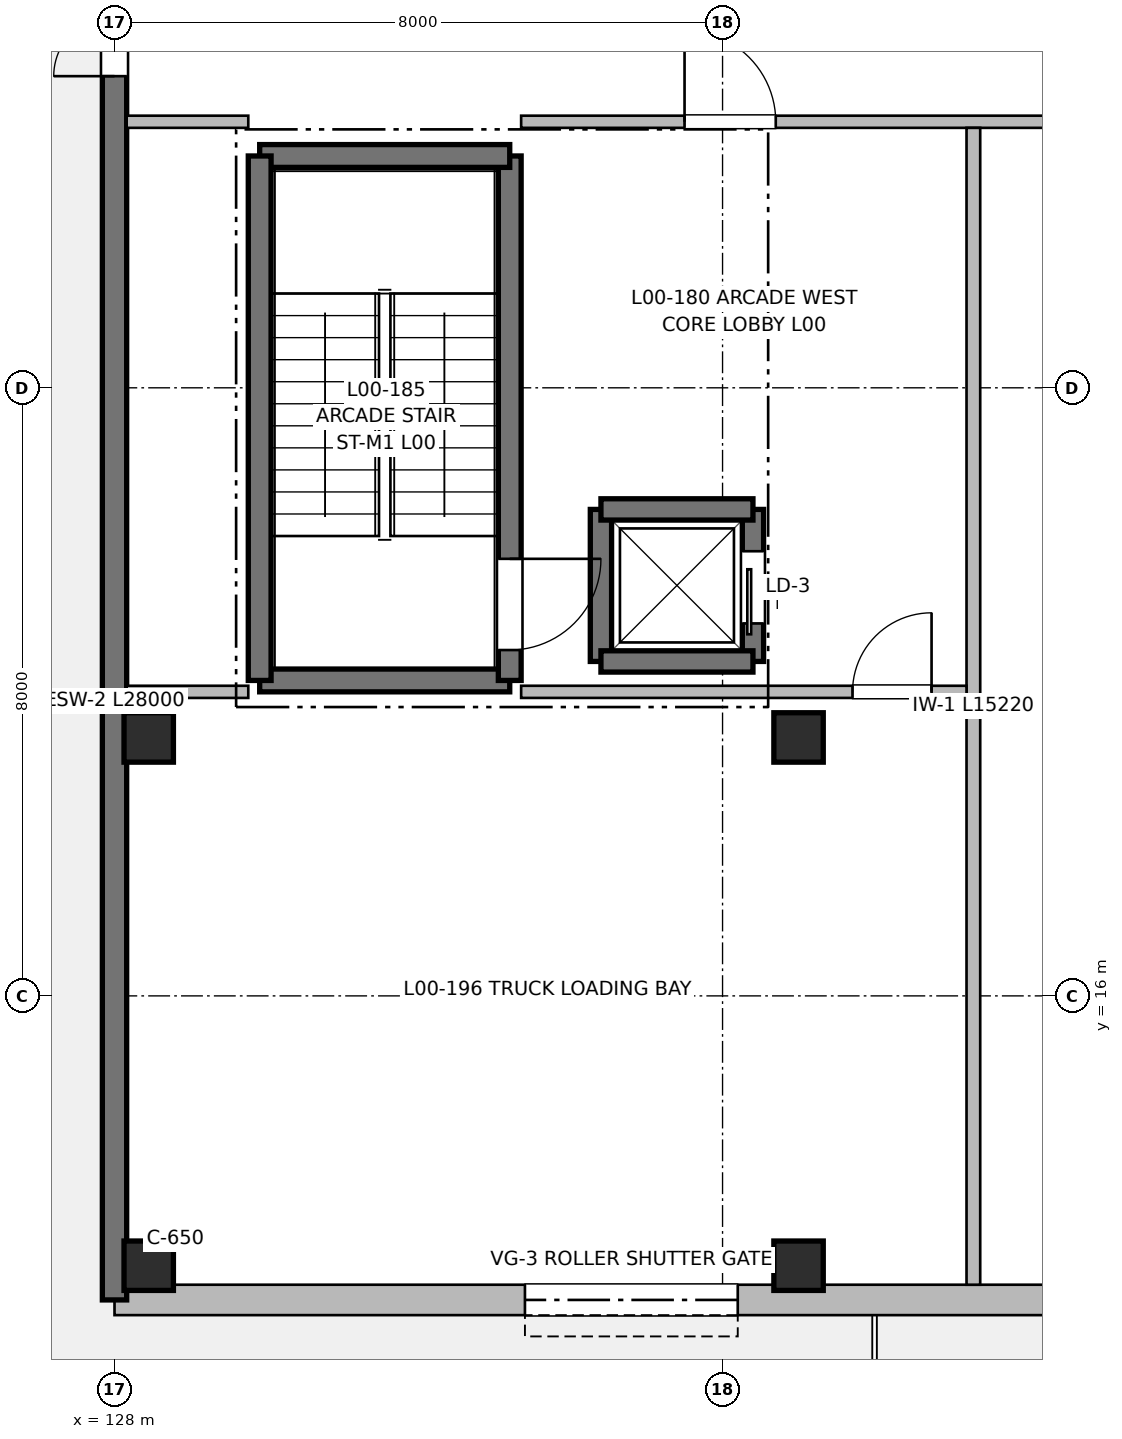
"""IFC4 building model, lengths in metres.
Left out: names, types, materials, properties, quantities, classifications, styles, units other than length and angle.
Written with IfcOpenShell. Run it as: python <this file> out.ifc"""

import sys

from ifc_helpers import new_model, si_unit, direction, frame, frame_2d, origin, origin_2d, place, context, subcontext, project, spatial, rectangle, extrude, element, fill, save


model = new_model("IFC4")
c1 = context("Model", 3, precision=1e-05, world=origin(), true_north=direction((0.0, 1.0)))
c2 = subcontext(c1, "Body", "Model", "MODEL_VIEW")
j1 = project(units=[si_unit("LENGTHUNIT", "METRE"), si_unit("PLANEANGLEUNIT", "RADIAN")], contexts=[c1])
p1 = place(None, origin())
s1 = spatial("IfcSite", under=j1, at=p1, CompositionType="ELEMENT")
p2 = place(p1, origin())
s2 = spatial("IfcBuilding", under=s1, at=p2, CompositionType="ELEMENT")
p3 = place(p2, origin())
s3 = spatial("IfcBuildingStorey", under=s2, at=p3, CompositionType="ELEMENT", Elevation=0.0)
for number, where, z_axis, x_axis in (
    (1, (128.45, 12.45, 0.0), (0.0, 0.0, 1.0), (1.0, 0.0, 0.0)),
    (2, (128.45, 19.4, 0.0), (0.0, 0.0, 1.0), (1.0, 0.0, 0.0)),
    (3, (137.0, 12.45, 0.0), (0.0, 0.0, 1.0), (1.0, 0.0, 0.0)),
    (4, (137.0, 19.4, 0.0), (0.0, 0.0, 1.0), (1.0, 0.0, 0.0)),
):
    element("IfcColumn", number, at=place(p3, frame(where, z_axis=z_axis, x_axis=x_axis)), inside=s3, PredefinedType="COLUMN", context=c2, shape_type="SweptSolid", body=[
        extrude(rectangle(XDim=0.65, YDim=0.65, at=origin_2d()), origin(), (0.0, 0.0, 1.0), 4.16),
    ])
p4 = place(p3, frame((176.0, 12.0, 0.0), z_axis=(0.0, 0.0, 1.0), x_axis=(-1.0, 0.0, 0.0)))
e5 = element("IfcWall", 5, at=p4, inside=s3, PredefinedType="SOLIDWALL", context=c2, shape_type="SweptSolid", body=[
    extrude(rectangle(XDim=48.0, YDim=0.4, at=frame_2d((24.0, 0.0))), origin(), (0.0, 0.0, 1.0), 3.9),
])
p5 = place(p4, frame((3.5, 0.0, 0.0)))
e6 = element("IfcOpeningElement", 6, at=p5, cuts=e5, PredefinedType="OPENING", context=c2, shape_type="SweptSolid", body=[
    extrude(rectangle(XDim=3.6, YDim=2.8, at=frame_2d((1.8, 1.4))), frame((0.0, 0.21, 0.0), z_axis=(0.0, -1.0, 0.0), x_axis=(1.0, 0.0, 0.0)), (0.0, 0.0, 1.0), 0.42),
])
p6 = place(p4, frame((18.85, 0.0, 0.0)))
e7 = element("IfcOpeningElement", 7, at=p6, cuts=e5, PredefinedType="OPENING", context=c2, shape_type="SweptSolid", body=[
    extrude(rectangle(XDim=3.6, YDim=2.8, at=frame_2d((1.8, 1.4))), frame((0.0, 0.21, 0.0), z_axis=(0.0, -1.0, 0.0), x_axis=(1.0, 0.0, 0.0)), (0.0, 0.0, 1.0), 0.42),
])
p7 = place(p4, frame((30.45, 0.0, 0.0)))
e8 = element("IfcOpeningElement", 8, at=p7, cuts=e5, PredefinedType="OPENING", context=c2, shape_type="SweptSolid", body=[
    extrude(rectangle(XDim=2.8, YDim=2.5, at=frame_2d((1.4, 1.25))), frame((0.0, 0.21, 0.0), z_axis=(0.0, -1.0, 0.0), x_axis=(1.0, 0.0, 0.0)), (0.0, 0.0, 1.0), 0.42),
])
p8 = place(p4, frame((39.8, 0.0, 0.0)))
e9 = element("IfcOpeningElement", 9, at=p8, cuts=e5, PredefinedType="OPENING", context=c2, shape_type="SweptSolid", body=[
    extrude(rectangle(XDim=2.8, YDim=2.5, at=frame_2d((1.4, 1.25))), frame((0.0, 0.21, 0.0), z_axis=(0.0, -1.0, 0.0), x_axis=(1.0, 0.0, 0.0)), (0.0, 0.0, 1.0), 0.42),
])
p9 = place(p3, frame((128.0, 12.0, 0.0), z_axis=(0.0, 0.0, 1.0), x_axis=(0.0, 1.0, 0.0)))
e10 = element("IfcWall", 10, at=p9, inside=s3, PredefinedType="SHEAR", context=c2, shape_type="SweptSolid", body=[
    extrude(rectangle(XDim=28.0, YDim=0.32, at=frame_2d((14.0, 0.0))), origin(), (0.0, 0.0, 1.0), 3.9),
])
p10 = place(p9, frame((16.1, 0.0, 0.0)))
e11 = element("IfcOpeningElement", 11, at=p10, cuts=e10, PredefinedType="OPENING", context=c2, shape_type="SweptSolid", body=[
    extrude(rectangle(XDim=1.6, YDim=2.35, at=frame_2d((0.8, 1.175))), frame((0.0, 0.17, 0.0), z_axis=(0.0, -1.0, 0.0), x_axis=(1.0, 0.0, 0.0)), (0.0, 0.0, 1.0), 0.34),
])
p11 = place(p3, frame((136.4, 20.4, 0.0), z_axis=(0.0, 0.0, 1.0), x_axis=(0.0, 1.0, 0.0)))
e12 = element("IfcWall", 12, at=p11, inside=s3, PredefinedType="SHEAR", context=c2, shape_type="SweptSolid", body=[
    extrude(rectangle(XDim=2.0, YDim=0.28, at=frame_2d((1.0, 0.0))), origin(), (0.0, 0.0, 1.0), 3.9),
])
p12 = place(p11, frame((0.5, 0.0, 0.0)))
e13 = element("IfcOpeningElement", 13, at=p12, cuts=e12, PredefinedType="OPENING", context=c2, shape_type="SweptSolid", body=[
    extrude(rectangle(XDim=0.95, YDim=2.15, at=frame_2d((0.475, 1.075))), frame((0.0, 0.15, 0.0), z_axis=(0.0, -1.0, 0.0), x_axis=(1.0, 0.0, 0.0)), (0.0, 0.0, 1.0), 0.3),
])
for number, where, z_axis, x_axis in (
    (14, (134.4, 20.4, 0.0), (0.0, 0.0, 1.0), (0.0, 1.0, 0.0)),
    (15, (134.4, 20.4, 0.0), (0.0, 0.0, 1.0), (1.0, 0.0, 0.0)),
    (16, (134.4, 22.4, 0.0), (0.0, 0.0, 1.0), (1.0, 0.0, 0.0)),
):
    element("IfcWall", number, at=place(p3, frame(where, z_axis=z_axis, x_axis=x_axis)), inside=s3, PredefinedType="SHEAR", context=c2, shape_type="SweptSolid", body=[
        extrude(rectangle(XDim=2.0, YDim=0.28, at=frame_2d((1.0, 0.0))), origin(), (0.0, 0.0, 1.0), 3.9),
    ])
p13 = place(p3, frame((133.2, 20.15, 0.0), z_axis=(0.0, 0.0, 1.0), x_axis=(-1.0, 0.0, 0.0)))
e17 = element("IfcWall", 17, at=p13, inside=s3, PredefinedType="SHEAR", context=c2, shape_type="SweptSolid", body=[
    extrude(rectangle(XDim=3.29, YDim=0.3, at=frame_2d((1.645, 0.0))), origin(), (0.0, 0.0, 1.0), 4.16),
])
p14 = place(p3, frame((133.2, 27.05, 0.0), z_axis=(0.0, 0.0, 1.0), x_axis=(0.0, -1.0, 0.0)))
e18 = element("IfcWall", 18, at=p14, inside=s3, PredefinedType="SHEAR", context=c2, shape_type="SweptSolid", body=[
    extrude(rectangle(XDim=6.9, YDim=0.3, at=frame_2d((3.45, 0.0))), origin(), (0.0, 0.0, 1.0), 4.16),
])
p15 = place(p14, frame((5.3, 0.0, 0.0)))
e19 = element("IfcOpeningElement", 19, at=p15, cuts=e18, PredefinedType="OPENING", context=c2, shape_type="SweptSolid", body=[
    extrude(rectangle(XDim=1.2, YDim=2.2, at=frame_2d((0.6, 1.1))), frame((0.0, 0.16, 0.0), z_axis=(0.0, -1.0, 0.0), x_axis=(1.0, 0.0, 0.0)), (0.0, 0.0, 1.0), 0.32),
])
p16 = place(p3, frame((129.91, 27.05, 0.0), z_axis=(0.0, 0.0, 1.0), x_axis=(1.0, 0.0, 0.0)))
e20 = element("IfcWall", 20, at=p16, inside=s3, PredefinedType="SHEAR", context=c2, shape_type="SweptSolid", body=[
    extrude(rectangle(XDim=3.29, YDim=0.3, at=frame_2d((1.645, 0.0))), origin(), (0.0, 0.0, 1.0), 4.16),
])
p17 = place(p3, frame((129.91, 20.15, 0.0), z_axis=(0.0, 0.0, 1.0), x_axis=(0.0, 1.0, 0.0)))
e21 = element("IfcWall", 21, at=p17, inside=s3, PredefinedType="SHEAR", context=c2, shape_type="SweptSolid", body=[
    extrude(rectangle(XDim=6.9, YDim=0.3, at=frame_2d((3.45, 0.0))), origin(), (0.0, 0.0, 1.0), 4.16),
])
p18 = place(p3, frame((128.16, 27.5, 0.0), z_axis=(0.0, 0.0, 1.0), x_axis=(1.0, 0.0, 0.0)))
e22 = element("IfcWall", 22, at=p18, inside=s3, PredefinedType="PARTITIONING", context=c2, shape_type="SweptSolid", body=[
    extrude(rectangle(XDim=1.6, YDim=0.16, at=frame_2d((0.8, 0.0))), origin(), (0.0, 0.0, 1.0), 3.89),
])
p19 = place(p3, frame((133.35, 27.5, 0.0), z_axis=(0.0, 0.0, 1.0), x_axis=(1.0, 0.0, 0.0)))
e23 = element("IfcWall", 23, at=p19, inside=s3, PredefinedType="PARTITIONING", context=c2, shape_type="SweptSolid", body=[
    extrude(rectangle(XDim=36.01, YDim=0.16, at=frame_2d((18.005, 0.0))), origin(), (0.0, 0.0, 1.0), 3.89),
])
p20 = place(p19, frame((2.15, 0.0, 0.0)))
e24 = element("IfcOpeningElement", 24, at=p20, cuts=e23, PredefinedType="OPENING", context=c2, shape_type="SweptSolid", body=[
    extrude(rectangle(XDim=1.2, YDim=2.2, at=frame_2d((0.6, 1.1))), frame((0.0, 0.09, 0.0), z_axis=(0.0, -1.0, 0.0), x_axis=(1.0, 0.0, 0.0)), (0.0, 0.0, 1.0), 0.18),
])
p21 = place(p19, frame((33.45, 0.0, 0.0)))
e25 = element("IfcOpeningElement", 25, at=p21, cuts=e23, PredefinedType="OPENING", context=c2, shape_type="SweptSolid", body=[
    extrude(rectangle(XDim=1.2, YDim=2.2, at=frame_2d((0.6, 1.1))), frame((0.0, 0.09, 0.0), z_axis=(0.0, -1.0, 0.0), x_axis=(1.0, 0.0, 0.0)), (0.0, 0.0, 1.0), 0.18),
])
p22 = place(p19, frame((8.93, 0.0, 0.0)))
e26 = element("IfcOpeningElement", 26, at=p22, cuts=e23, PredefinedType="OPENING", context=c2, shape_type="SweptSolid", body=[
    extrude(rectangle(XDim=1.12, YDim=2.2, at=frame_2d((0.56, 1.1))), frame((0.0, 0.09, 0.0), z_axis=(0.0, -1.0, 0.0), x_axis=(1.0, 0.0, 0.0)), (0.0, 0.0, 1.0), 0.18),
])
p23 = place(p19, frame((18.13, 0.0, 0.0)))
e27 = element("IfcOpeningElement", 27, at=p23, cuts=e23, PredefinedType="OPENING", context=c2, shape_type="SweptSolid", body=[
    extrude(rectangle(XDim=1.5, YDim=2.2, at=frame_2d((0.75, 1.1))), frame((0.0, 0.09, 0.0), z_axis=(0.0, -1.0, 0.0), x_axis=(1.0, 0.0, 0.0)), (0.0, 0.0, 1.0), 0.18),
])
p24 = place(p19, frame((25.53, 0.0, 0.0)))
e28 = element("IfcOpeningElement", 28, at=p24, cuts=e23, PredefinedType="OPENING", context=c2, shape_type="SweptSolid", body=[
    extrude(rectangle(XDim=0.86, YDim=2.1, at=frame_2d((0.43, 1.05))), frame((0.0, 0.09, 0.0), z_axis=(0.0, -1.0, 0.0), x_axis=(1.0, 0.0, 0.0)), (0.0, 0.0, 1.0), 0.18),
])
p25 = place(p19, frame((28.83, 0.0, 0.0)))
e29 = element("IfcOpeningElement", 29, at=p25, cuts=e23, PredefinedType="OPENING", context=c2, shape_type="SweptSolid", body=[
    extrude(rectangle(XDim=0.94, YDim=2.1, at=frame_2d((0.47, 1.05))), frame((0.0, 0.09, 0.0), z_axis=(0.0, -1.0, 0.0), x_axis=(1.0, 0.0, 0.0)), (0.0, 0.0, 1.0), 0.18),
])
p26 = place(p3, frame((139.3, 12.2, 0.0), z_axis=(0.0, 0.0, 1.0), x_axis=(0.0, 1.0, 0.0)))
e30 = element("IfcWall", 30, at=p26, inside=s3, PredefinedType="PARTITIONING", context=c2, shape_type="SweptSolid", body=[
    extrude(rectangle(XDim=15.22, YDim=0.18, at=frame_2d((7.61, 0.0))), origin(), (0.0, 0.0, 1.0), 3.89),
])
p27 = place(p3, frame((128.16, 20.0, 0.0), z_axis=(0.0, 0.0, 1.0), x_axis=(1.0, 0.0, 0.0)))
e31 = element("IfcWall", 31, at=p27, inside=s3, PredefinedType="PARTITIONING", context=c2, shape_type="SweptSolid", body=[
    extrude(rectangle(XDim=1.6, YDim=0.16, at=frame_2d((0.8, 0.0))), origin(), (0.0, 0.0, 1.0), 3.89),
])
p28 = place(p3, frame((133.35, 20.0, 0.0), z_axis=(0.0, 0.0, 1.0), x_axis=(1.0, 0.0, 0.0)))
e32 = element("IfcWall", 32, at=p28, inside=s3, PredefinedType="PARTITIONING", context=c2, shape_type="SweptSolid", body=[
    extrude(rectangle(XDim=5.86, YDim=0.16, at=frame_2d((2.93, 0.0))), origin(), (0.0, 0.0, 1.0), 3.89),
])
p29 = place(p28, frame((4.36, 0.0, 0.0)))
e33 = element("IfcOpeningElement", 33, at=p29, cuts=e32, PredefinedType="OPENING", context=c2, shape_type="SweptSolid", body=[
    extrude(rectangle(XDim=1.04, YDim=2.15, at=frame_2d((0.52, 1.075))), frame((0.0, 0.09, 0.0), z_axis=(0.0, -1.0, 0.0), x_axis=(1.0, 0.0, 0.0)), (0.0, 0.0, 1.0), 0.18),
])
p30 = place(p12, origin())
e34 = element("IfcDoor", 34, at=p30, inside=s3, OperationType="SLIDING_TO_LEFT", PredefinedType="DOOR", context=c2, shape_type="SweptSolid", body=[
    extrude(rectangle(XDim=0.95, YDim=2.15, at=frame_2d((0.475, 1.075))), frame((0.0, 0.025, 0.0), z_axis=(0.0, -1.0, 0.0), x_axis=(1.0, 0.0, 0.0)), (0.0, 0.0, 1.0), 0.05),
])
fill(e13, e34)
p31 = place(p10, origin())
e35 = element("IfcDoor", 35, at=p31, inside=s3, OperationType="DOUBLE_DOOR_SINGLE_SWING", PredefinedType="DOOR", context=c2, shape_type="SweptSolid", body=[
    extrude(rectangle(XDim=1.6, YDim=2.35, at=frame_2d((0.8, 1.175))), frame((0.0, 0.025, 0.0), z_axis=(0.0, -1.0, 0.0), x_axis=(1.0, 0.0, 0.0)), (0.0, 0.0, 1.0), 0.05),
])
fill(e11, e35)
p32 = place(p8, origin())
e36 = element("IfcDoor", 36, at=p32, inside=s3, OperationType="ROLLINGUP", PredefinedType="GATE", context=c2, shape_type="SweptSolid", body=[
    extrude(rectangle(XDim=2.8, YDim=2.5, at=frame_2d((1.4, 1.25))), frame((0.0, 0.025, 0.0), z_axis=(0.0, -1.0, 0.0), x_axis=(1.0, 0.0, 0.0)), (0.0, 0.0, 1.0), 0.05),
])
fill(e9, e36)
p33 = place(p15, origin())
e37 = element("IfcDoor", 37, at=p33, inside=s3, OperationType="SINGLE_SWING_LEFT", PredefinedType="DOOR", context=c2, shape_type="SweptSolid", body=[
    extrude(rectangle(XDim=1.2, YDim=2.2, at=frame_2d((0.6, 1.1))), frame((0.0, 0.025, 0.0), z_axis=(0.0, -1.0, 0.0), x_axis=(1.0, 0.0, 0.0)), (0.0, 0.0, 1.0), 0.05),
])
fill(e19, e37)
p34 = place(p20, origin())
e38 = element("IfcDoor", 38, at=p34, inside=s3, OperationType="SINGLE_SWING_LEFT", PredefinedType="DOOR", context=c2, shape_type="SweptSolid", body=[
    extrude(rectangle(XDim=1.2, YDim=2.2, at=frame_2d((0.6, 1.1))), frame((0.0, 0.025, 0.0), z_axis=(0.0, -1.0, 0.0), x_axis=(1.0, 0.0, 0.0)), (0.0, 0.0, 1.0), 0.05),
])
fill(e24, e38)
p35 = place(p29, origin())
e39 = element("IfcDoor", 39, at=p35, inside=s3, OperationType="SINGLE_SWING_RIGHT", PredefinedType="DOOR", context=c2, shape_type="SweptSolid", body=[
    extrude(rectangle(XDim=1.04, YDim=2.15, at=frame_2d((0.52, 1.075))), frame((0.0, 0.025, 0.0), z_axis=(0.0, -1.0, 0.0), x_axis=(1.0, 0.0, 0.0)), (0.0, 0.0, 1.0), 0.05),
])
fill(e33, e39)
save(model, sys.argv[1])
